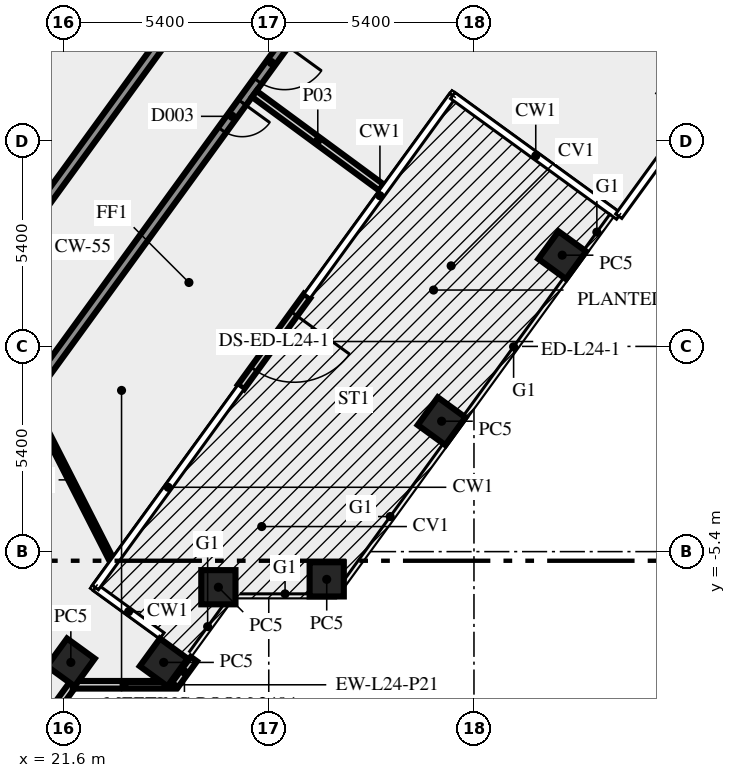
"""IFC4 building model, lengths in metres.
Left out: names, types, materials, properties, quantities, classifications, styles, units other than length and angle.
Written with IfcOpenShell. Run it as: python <this file> out.ifc"""

import sys

from ifc_helpers import new_model, si_unit, direction, frame, frame_2d, origin, origin_2d, place, context, subcontext, project, spatial, rectangle, extrude, element, fill, save


model = new_model("IFC4")
c1 = context("Model", 3, precision=1e-05, world=origin(), true_north=direction((0.0, 1.0)))
c2 = subcontext(c1, "Body", "Model", "MODEL_VIEW")
j1 = project(units=[si_unit("LENGTHUNIT", "METRE"), si_unit("PLANEANGLEUNIT", "RADIAN")], contexts=[c1])
p1 = place(None, origin())
s1 = spatial("IfcSite", under=j1, at=p1, CompositionType="ELEMENT")
p2 = place(p1, origin())
s2 = spatial("IfcBuilding", under=s1, at=p2, CompositionType="ELEMENT")
p3 = place(p2, frame((0.0, 0.0, 105.0)))
s3 = spatial("IfcBuildingStorey", under=s2, at=p3, CompositionType="ELEMENT", Elevation=105.0)
for number, where, z_axis, x_axis in (
    (1, (21.792, -8.315, 0.0), (0.0, 0.0, 1.0), (0.588, 0.809, 0.0)),
    (2, (24.235, -8.315, 0.0), (0.0, 0.0, 1.0), (0.588, 0.809, 0.0)),
    (3, (25.674, -6.337, 0.0), (0.0, 0.0, 1.0), (1.0, 0.0, 0.0)),
    (4, (28.525, -6.13, 0.0), (0.0, 0.0, 1.0), (1.0, 0.0, 0.0)),
    (5, (31.548, -1.969, 0.0), (0.0, 0.0, 1.0), (0.588, 0.809, 0.0)),
    (6, (34.722, 2.4, 0.0), (0.0, 0.0, 1.0), (0.588, 0.809, 0.0)),
):
    element("IfcColumn", number, at=place(p3, frame(where, z_axis=z_axis, x_axis=x_axis)), inside=s3, PredefinedType="COLUMN", context=c2, shape_type="SweptSolid", body=[
        extrude(rectangle(XDim=0.9, YDim=0.9, at=origin_2d()), origin(), (0.0, 0.0, 1.0), 3.65),
    ])
p4 = place(p3, frame((20.253, -11.083, 0.0), z_axis=(0.0, 0.0, 1.0), x_axis=(0.587766567315, 0.809030569476, 0.0)))
e7 = element("IfcWall", 7, at=p4, inside=s3, PredefinedType="SOLIDWALL", context=c2, shape_type="SweptSolid", body=[
    extrude(rectangle(XDim=2.688, YDim=0.2, at=frame_2d((1.344, 0.0))), origin(), (0.0, 0.0, 1.0), 3.65),
])
p5 = place(p3, frame((21.843, -8.904, 0.0), z_axis=(0.0, 0.0, 1.0), x_axis=(1.0, 0.0, 0.0)))
e8 = element("IfcWall", 8, at=p5, inside=s3, PredefinedType="SOLIDWALL", context=c2, shape_type="SweptSolid", body=[
    extrude(rectangle(XDim=2.7, YDim=0.2, at=frame_2d((1.35, 0.0))), origin(), (0.0, 0.0, 1.0), 3.65),
])
p6 = place(p3, frame((24.533, -8.909, 0.0), z_axis=(0.0, 0.0, 1.0), x_axis=(0.587551368178, 0.809186869488, 0.0)))
e9 = element("IfcWall", 9, at=p6, inside=s3, PredefinedType="SOLIDWALL", context=c2, shape_type="SweptSolid", body=[
    extrude(rectangle(XDim=0.843, YDim=0.2, at=frame_2d((0.421, 0.0))), origin(), (0.0, 0.0, 1.0), 3.65),
])
p7 = place(p3, frame((28.01, 1.327, 0.0), z_axis=(0.0, 0.0, 1.0), x_axis=(-0.587735577821, -0.809053082661, 0.0)))
e10 = element("IfcWall", 10, at=p7, inside=s3, PredefinedType="SOLIDWALL", context=c2, shape_type="SweptSolid", body=[
    extrude(rectangle(XDim=2.963, YDim=0.2, at=frame_2d((1.481, 0.0))), origin(), (0.0, 0.0, 1.0), 3.65),
])
p8 = place(p7, frame((0.582, 0.0, 0.0)))
e11 = element("IfcOpeningElement", 11, at=p8, cuts=e10, PredefinedType="OPENING", context=c2, shape_type="SweptSolid", body=[
    extrude(rectangle(XDim=1.8, YDim=2.4, at=frame_2d((0.9, 1.2))), frame((0.0, 0.11, 0.0), z_axis=(0.0, -1.0, 0.0), x_axis=(1.0, 0.0, 0.0)), (0.0, 0.0, 1.0), 0.22),
])
p9 = place(p3, frame((17.545, -1.125, 0.0), z_axis=(0.0, 0.0, 1.0), x_axis=(0.587791430994, 0.80901250525, 0.0)))
e12 = element("IfcWall", 12, at=p9, inside=s3, PredefinedType="SOLIDWALL", context=c2, shape_type="SweptSolid", body=[
    extrude(rectangle(XDim=24.703, YDim=0.25, at=frame_2d((12.352, 0.0))), origin(), (0.0, 0.0, 1.0), 3.65),
])
p10 = place(p9, frame((3.442, 0.0, 0.0)))
e13 = element("IfcOpeningElement", 13, at=p10, cuts=e12, PredefinedType="OPENING", context=c2, shape_type="SweptSolid", body=[
    extrude(rectangle(XDim=1.2, YDim=2.1, at=frame_2d((0.6, 1.05))), frame((0.0, 0.135, 0.0), z_axis=(0.0, -1.0, 0.0), x_axis=(1.0, 0.0, 0.0)), (0.0, 0.0, 1.0), 0.27),
])
p11 = place(p9, frame((23.329, 0.0, 0.0)))
e14 = element("IfcOpeningElement", 14, at=p11, cuts=e12, PredefinedType="OPENING", context=c2, shape_type="SweptSolid", body=[
    extrude(rectangle(XDim=0.9, YDim=2.1, at=frame_2d((0.45, 1.05))), frame((0.0, 0.135, 0.0), z_axis=(0.0, -1.0, 0.0), x_axis=(1.0, 0.0, 0.0)), (0.0, 0.0, 1.0), 0.27),
])
p12 = place(p3, frame((34.062, 17.101, 0.0), z_axis=(0.0, 0.0, 1.0), x_axis=(-0.58778129431, -0.809019870003, 0.0)))
e15 = element("IfcWall", 15, at=p12, inside=s3, PredefinedType="SOLIDWALL", context=c2, shape_type="SweptSolid", body=[
    extrude(rectangle(XDim=23.021, YDim=0.25, at=frame_2d((11.51, 0.0))), origin(), (0.0, 0.0, 1.0), 3.65),
])
p13 = place(p12, frame((11.304, 0.0, 0.0)))
e16 = element("IfcOpeningElement", 16, at=p13, cuts=e15, PredefinedType="OPENING", context=c2, shape_type="SweptSolid", body=[
    extrude(rectangle(XDim=1.2, YDim=2.1, at=frame_2d((0.6, 1.05))), frame((0.0, 0.135, 0.0), z_axis=(0.0, -1.0, 0.0), x_axis=(1.0, 0.0, 0.0)), (0.0, 0.0, 1.0), 0.27),
])
p14 = place(p12, frame((13.205, 0.0, 0.0)))
e17 = element("IfcOpeningElement", 17, at=p14, cuts=e15, PredefinedType="OPENING", context=c2, shape_type="SweptSolid", body=[
    extrude(rectangle(XDim=0.9, YDim=2.1, at=frame_2d((0.45, 1.05))), frame((0.0, 0.135, 0.0), z_axis=(0.0, -1.0, 0.0), x_axis=(1.0, 0.0, 0.0)), (0.0, 0.0, 1.0), 0.27),
])
p15 = place(p3, frame((26.619, 6.643, 0.0), z_axis=(0.0, 0.0, 1.0), x_axis=(0.805298264495, -0.592869888931, 0.0)))
e18 = element("IfcWall", 18, at=p15, inside=s3, PredefinedType="SOLIDWALL", context=c2, shape_type="SweptSolid", body=[
    extrude(rectangle(XDim=4.15, YDim=0.2, at=frame_2d((2.075, 0.0))), origin(), (0.0, 0.0, 1.0), 3.65),
])
p16 = place(p3, frame((20.739, -1.45, 0.0), z_axis=(0.0, 0.0, 1.0), x_axis=(0.453952647408, -0.891025809902, 0.0)))
e19 = element("IfcWall", 19, at=p16, inside=s3, PredefinedType="PARTITIONING", context=c2, shape_type="SweptSolid", body=[
    extrude(rectangle(XDim=4.628, YDim=0.12, at=frame_2d((2.314, 0.0))), origin(), (0.0, 0.0, 1.0), 3.65),
])
p17 = place(p8, origin())
e20 = element("IfcDoor", 20, at=p17, inside=s3, OperationType="DOUBLE_DOOR_SINGLE_SWING", PredefinedType="DOOR", context=c2, shape_type="SweptSolid", body=[
    extrude(rectangle(XDim=1.8, YDim=2.4, at=frame_2d((0.9, 1.2))), frame((0.0, 0.025, 0.0), z_axis=(0.0, -1.0, 0.0), x_axis=(1.0, 0.0, 0.0)), (0.0, 0.0, 1.0), 0.05),
])
fill(e11, e20)
p18 = place(p13, origin())
e21 = element("IfcDoor", 21, at=p18, inside=s3, OperationType="SINGLE_SWING_RIGHT", PredefinedType="DOOR", context=c2, shape_type="SweptSolid", body=[
    extrude(rectangle(XDim=1.2, YDim=2.1, at=frame_2d((0.6, 1.05))), frame((0.0, 0.025, 0.0), z_axis=(0.0, -1.0, 0.0), x_axis=(1.0, 0.0, 0.0)), (0.0, 0.0, 1.0), 0.05),
])
fill(e16, e21)
p19 = place(p14, origin())
e22 = element("IfcDoor", 22, at=p19, inside=s3, OperationType="SINGLE_SWING_LEFT", PredefinedType="DOOR", context=c2, shape_type="SweptSolid", body=[
    extrude(rectangle(XDim=0.9, YDim=2.1, at=frame_2d((0.45, 1.05))), frame((0.0, 0.025, 0.0), z_axis=(0.0, -1.0, 0.0), x_axis=(1.0, 0.0, 0.0)), (0.0, 0.0, 1.0), 0.05),
])
fill(e17, e22)
save(model, sys.argv[1])
